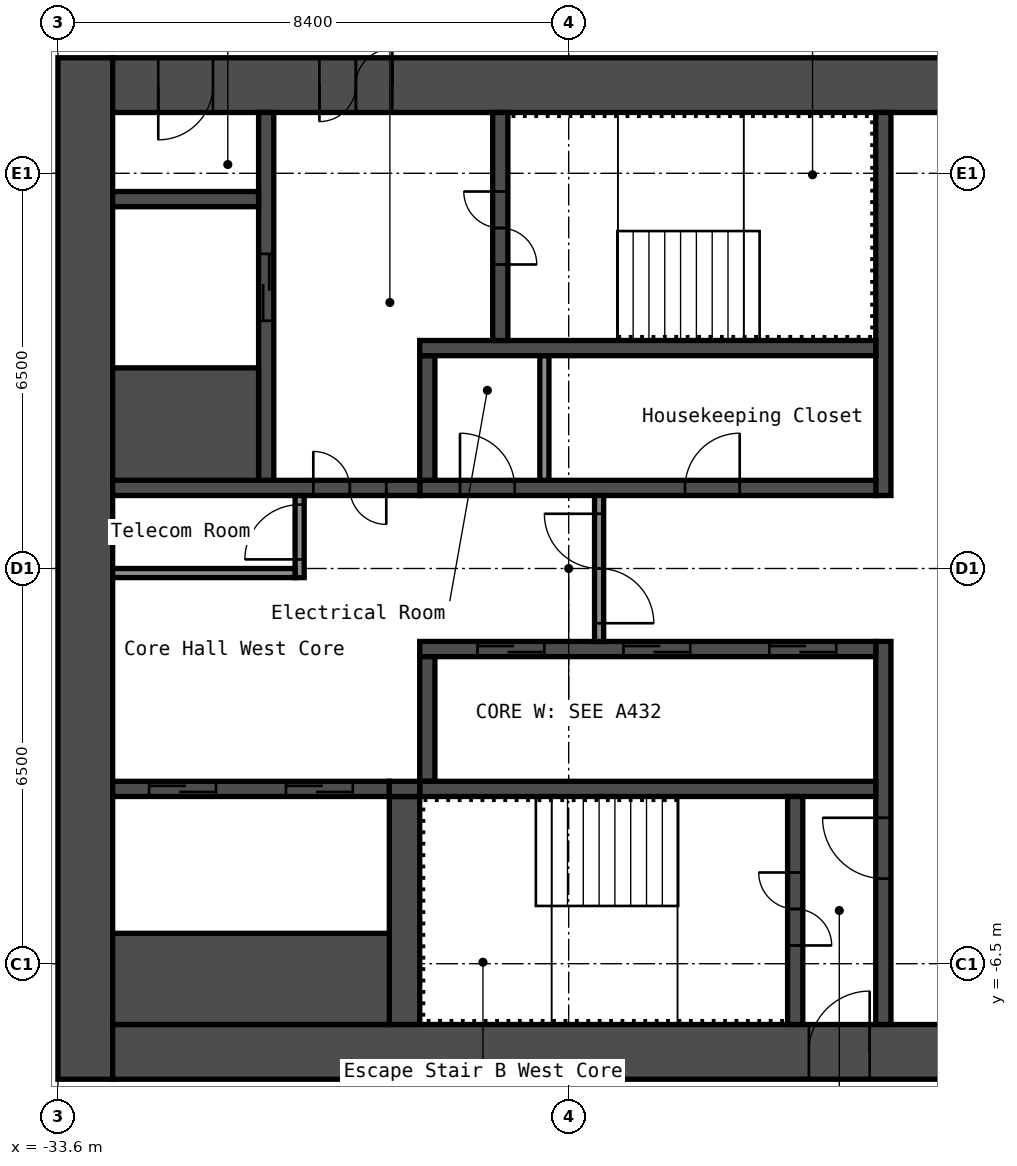
"""IFC4 building model, lengths in metres.
Left out: names, types, materials, properties, quantities, classifications, styles, units other than length and angle.
Written with IfcOpenShell. Run it as: python <this file> out.ifc"""

import sys

from ifc_helpers import new_model, si_unit, direction, frame, frame_2d, origin, place, context, subcontext, project, spatial, rectangle, extrude, element, fill, save


model = new_model("IFC4")
c1 = context("Model", 3, precision=1e-05, world=origin(), true_north=direction((0.0, 1.0)))
c2 = subcontext(c1, "Body", "Model", "MODEL_VIEW")
j1 = project(units=[si_unit("LENGTHUNIT", "METRE"), si_unit("PLANEANGLEUNIT", "RADIAN")], contexts=[c1])
p1 = place(None, origin())
s1 = spatial("IfcSite", under=j1, at=p1, CompositionType="ELEMENT")
p2 = place(p1, origin())
s2 = spatial("IfcBuilding", under=s1, at=p2, CompositionType="ELEMENT")
p3 = place(p2, frame((0.0, 0.0, 225.0)))
s3 = spatial("IfcBuildingStorey", under=s2, at=p3, CompositionType="ELEMENT", Elevation=225.0)
p4 = place(p3, frame((-33.15, -8.4, 0.0), z_axis=(0.0, 0.0, 1.0), x_axis=(0.0, 1.0, 0.0)))
e1 = element("IfcWall", 1, at=p4, inside=s3, PredefinedType="SHEAR", context=c2, shape_type="SweptSolid", body=[
    extrude(rectangle(XDim=16.8, YDim=0.9, at=frame_2d((8.4, 0.0))), origin(), (0.0, 0.0, 1.0), 2.9),
])
p5 = place(p3, frame((-32.7, 7.95, 0.0), z_axis=(0.0, 0.0, 1.0), x_axis=(1.0, 0.0, 0.0)))
e2 = element("IfcWall", 2, at=p5, inside=s3, PredefinedType="SHEAR", context=c2, shape_type="SweptSolid", body=[
    extrude(rectangle(XDim=15.0, YDim=0.9, at=frame_2d((7.5, 0.0))), origin(), (0.0, 0.0, 1.0), 2.9),
])
p6 = place(p5, frame((3.4, 0.0, 0.0)))
e3 = element("IfcOpeningElement", 3, at=p6, cuts=e2, PredefinedType="OPENING", context=c2, shape_type="SweptSolid", body=[
    extrude(rectangle(XDim=1.2, YDim=2.1, at=frame_2d((0.6, 1.05))), frame((0.0, 0.46, 0.0), z_axis=(0.0, -1.0, 0.0), x_axis=(1.0, 0.0, 0.0)), (0.0, 0.0, 1.0), 0.92),
])
p7 = place(p5, frame((0.75, 0.0, 0.0)))
e4 = element("IfcOpeningElement", 4, at=p7, cuts=e2, PredefinedType="OPENING", context=c2, shape_type="SweptSolid", body=[
    extrude(rectangle(XDim=0.9, YDim=2.1, at=frame_2d((0.45, 1.05))), frame((0.0, 0.46, 0.0), z_axis=(0.0, -1.0, 0.0), x_axis=(1.0, 0.0, 0.0)), (0.0, 0.0, 1.0), 0.92),
])
p8 = place(p3, frame((-32.7, -7.95, 0.0), z_axis=(0.0, 0.0, 1.0), x_axis=(1.0, 0.0, 0.0)))
e5 = element("IfcWall", 5, at=p8, inside=s3, PredefinedType="SHEAR", context=c2, shape_type="SweptSolid", body=[
    extrude(rectangle(XDim=15.0, YDim=0.9, at=frame_2d((7.5, 0.0))), origin(), (0.0, 0.0, 1.0), 2.9),
])
p9 = place(p8, frame((11.45, 0.0, 0.0)))
e6 = element("IfcOpeningElement", 6, at=p9, cuts=e5, PredefinedType="OPENING", context=c2, shape_type="SweptSolid", body=[
    extrude(rectangle(XDim=1.0, YDim=2.1, at=frame_2d((0.5, 1.05))), frame((0.0, 0.46, 0.0), z_axis=(0.0, -1.0, 0.0), x_axis=(1.0, 0.0, 0.0)), (0.0, 0.0, 1.0), 0.92),
])
p10 = place(p3, frame((-20.025, 1.2, 0.0), z_axis=(0.0, 0.0, 1.0), x_axis=(0.0, 1.0, 0.0)))
e7 = element("IfcWall", 7, at=p10, inside=s3, PredefinedType="SHEAR", context=c2, shape_type="SweptSolid", body=[
    extrude(rectangle(XDim=6.3, YDim=0.25, at=frame_2d((3.15, 0.0))), origin(), (0.0, 0.0, 1.0), 2.9),
])
p11 = place(p3, frame((-20.025, -7.5, 0.0), z_axis=(0.0, 0.0, 1.0), x_axis=(0.0, 1.0, 0.0)))
e8 = element("IfcWall", 8, at=p11, inside=s3, PredefinedType="SHEAR", context=c2, shape_type="SweptSolid", body=[
    extrude(rectangle(XDim=6.3, YDim=0.25, at=frame_2d((3.15, 0.0))), origin(), (0.0, 0.0, 1.0), 2.9),
])
p12 = place(p11, frame((2.4, 0.0, 0.0)))
e9 = element("IfcOpeningElement", 9, at=p12, cuts=e8, PredefinedType="OPENING", context=c2, shape_type="SweptSolid", body=[
    extrude(rectangle(XDim=1.0, YDim=2.1, at=frame_2d((0.5, 1.05))), frame((0.0, 0.135, 0.0), z_axis=(0.0, -1.0, 0.0), x_axis=(1.0, 0.0, 0.0)), (0.0, 0.0, 1.0), 0.27),
])
p13 = place(p3, frame((-27.65, 1.325, 0.0), z_axis=(0.0, 0.0, 1.0), x_axis=(1.0, 0.0, 0.0)))
e10 = element("IfcWall", 10, at=p13, inside=s3, PredefinedType="SHEAR", context=c2, shape_type="SweptSolid", body=[
    extrude(rectangle(XDim=7.5, YDim=0.25, at=frame_2d((3.75, 0.0))), origin(), (0.0, 0.0, 1.0), 2.9),
])
p14 = place(p13, frame((4.363, 0.0, 0.0)))
e11 = element("IfcOpeningElement", 11, at=p14, cuts=e10, PredefinedType="OPENING", context=c2, shape_type="SweptSolid", body=[
    extrude(rectangle(XDim=0.9, YDim=2.1, at=frame_2d((0.45, 1.05))), frame((0.0, 0.135, 0.0), z_axis=(0.0, -1.0, 0.0), x_axis=(1.0, 0.0, 0.0)), (0.0, 0.0, 1.0), 0.27),
])
p15 = place(p13, frame((0.663, 0.0, 0.0)))
e12 = element("IfcOpeningElement", 12, at=p15, cuts=e10, PredefinedType="OPENING", context=c2, shape_type="SweptSolid", body=[
    extrude(rectangle(XDim=0.9, YDim=2.1, at=frame_2d((0.45, 1.05))), frame((0.0, 0.135, 0.0), z_axis=(0.0, -1.0, 0.0), x_axis=(1.0, 0.0, 0.0)), (0.0, 0.0, 1.0), 0.27),
])
p16 = place(p3, frame((-27.525, 1.45, 0.0), z_axis=(0.0, 0.0, 1.0), x_axis=(0.0, 1.0, 0.0)))
e13 = element("IfcWall", 13, at=p16, inside=s3, PredefinedType="SHEAR", context=c2, shape_type="SweptSolid", body=[
    extrude(rectangle(XDim=2.05, YDim=0.25, at=frame_2d((1.025, 0.0))), origin(), (0.0, 0.0, 1.0), 2.9),
])
p17 = place(p3, frame((-27.65, 3.625, 0.0), z_axis=(0.0, 0.0, 1.0), x_axis=(1.0, 0.0, 0.0)))
e14 = element("IfcWall", 14, at=p17, inside=s3, PredefinedType="SHEAR", context=c2, shape_type="SweptSolid", body=[
    extrude(rectangle(XDim=7.5, YDim=0.25, at=frame_2d((3.75, 0.0))), origin(), (0.0, 0.0, 1.0), 2.9),
])
p18 = place(p3, frame((-26.325, 3.75, 0.0), z_axis=(0.0, 0.0, 1.0), x_axis=(0.0, 1.0, 0.0)))
e15 = element("IfcWall", 15, at=p18, inside=s3, PredefinedType="SHEAR", context=c2, shape_type="SweptSolid", body=[
    extrude(rectangle(XDim=3.75, YDim=0.25, at=frame_2d((1.875, 0.0))), origin(), (0.0, 0.0, 1.0), 2.9),
])
p19 = place(p18, frame((1.25, 0.0, 0.0)))
e16 = element("IfcOpeningElement", 16, at=p19, cuts=e15, PredefinedType="OPENING", context=c2, shape_type="SweptSolid", body=[
    extrude(rectangle(XDim=1.2, YDim=2.1, at=frame_2d((0.6, 1.05))), frame((0.0, 0.135, 0.0), z_axis=(0.0, -1.0, 0.0), x_axis=(1.0, 0.0, 0.0)), (0.0, 0.0, 1.0), 0.27),
])
p20 = place(p3, frame((-32.7, 1.325, 0.0), z_axis=(0.0, 0.0, 1.0), x_axis=(1.0, 0.0, 0.0)))
e17 = element("IfcWall", 17, at=p20, inside=s3, PredefinedType="SHEAR", context=c2, shape_type="SweptSolid", body=[
    extrude(rectangle(XDim=5.05, YDim=0.25, at=frame_2d((2.525, 0.0))), origin(), (0.0, 0.0, 1.0), 2.9),
])
p21 = place(p20, frame((3.3, 0.0, 0.0)))
e18 = element("IfcOpeningElement", 18, at=p21, cuts=e17, PredefinedType="OPENING", context=c2, shape_type="SweptSolid", body=[
    extrude(rectangle(XDim=1.2, YDim=2.1, at=frame_2d((0.6, 1.05))), frame((0.0, 0.135, 0.0), z_axis=(0.0, -1.0, 0.0), x_axis=(1.0, 0.0, 0.0)), (0.0, 0.0, 1.0), 0.27),
])
p22 = place(p3, frame((-30.175, 1.45, 0.0), z_axis=(0.0, 0.0, 1.0), x_axis=(0.0, 1.0, 0.0)))
e19 = element("IfcWall", 19, at=p22, inside=s3, PredefinedType="SHEAR", context=c2, shape_type="SweptSolid", body=[
    extrude(rectangle(XDim=6.05, YDim=0.25, at=frame_2d((3.025, 0.0))), origin(), (0.0, 0.0, 1.0), 2.9),
])
p23 = place(p22, frame((2.625, 0.0, 0.0)))
e20 = element("IfcOpeningElement", 20, at=p23, cuts=e19, PredefinedType="OPENING", context=c2, shape_type="SweptSolid", body=[
    extrude(rectangle(XDim=1.1, YDim=2.1, at=frame_2d((0.55, 1.05))), frame((0.0, 0.135, 0.0), z_axis=(0.0, -1.0, 0.0), x_axis=(1.0, 0.0, 0.0)), (0.0, 0.0, 1.0), 0.27),
])
p24 = place(p3, frame((-32.7, 2.375, 0.0), z_axis=(0.0, 0.0, 1.0), x_axis=(1.0, 0.0, 0.0)))
e21 = element("IfcWall", 21, at=p24, inside=s3, PredefinedType="SHEAR", context=c2, shape_type="SweptSolid", body=[
    extrude(rectangle(XDim=2.4, YDim=1.85, at=frame_2d((1.2, 0.0))), origin(), (0.0, 0.0, 1.0), 2.9),
])
p25 = place(p3, frame((-32.7, 6.075, 0.0), z_axis=(0.0, 0.0, 1.0), x_axis=(1.0, 0.0, 0.0)))
e22 = element("IfcWall", 22, at=p25, inside=s3, PredefinedType="SHEAR", context=c2, shape_type="SweptSolid", body=[
    extrude(rectangle(XDim=2.4, YDim=0.25, at=frame_2d((1.2, 0.0))), origin(), (0.0, 0.0, 1.0), 2.9),
])
p26 = place(p3, frame((-27.65, -1.325, 0.0), z_axis=(0.0, 0.0, 1.0), x_axis=(1.0, 0.0, 0.0)))
e23 = element("IfcWall", 23, at=p26, inside=s3, PredefinedType="SHEAR", context=c2, shape_type="SweptSolid", body=[
    extrude(rectangle(XDim=7.5, YDim=0.25, at=frame_2d((3.75, 0.0))), origin(), (0.0, 0.0, 1.0), 2.9),
])
p27 = place(p26, frame((5.75, 0.0, 0.0)))
e24 = element("IfcOpeningElement", 24, at=p27, cuts=e23, PredefinedType="OPENING", context=c2, shape_type="SweptSolid", body=[
    extrude(rectangle(XDim=1.1, YDim=2.1, at=frame_2d((0.55, 1.05))), frame((0.0, 0.135, 0.0), z_axis=(0.0, -1.0, 0.0), x_axis=(1.0, 0.0, 0.0)), (0.0, 0.0, 1.0), 0.27),
])
p28 = place(p26, frame((3.35, 0.0, 0.0)))
e25 = element("IfcOpeningElement", 25, at=p28, cuts=e23, PredefinedType="OPENING", context=c2, shape_type="SweptSolid", body=[
    extrude(rectangle(XDim=1.1, YDim=2.1, at=frame_2d((0.55, 1.05))), frame((0.0, 0.135, 0.0), z_axis=(0.0, -1.0, 0.0), x_axis=(1.0, 0.0, 0.0)), (0.0, 0.0, 1.0), 0.27),
])
p29 = place(p26, frame((0.95, 0.0, 0.0)))
e26 = element("IfcOpeningElement", 26, at=p29, cuts=e23, PredefinedType="OPENING", context=c2, shape_type="SweptSolid", body=[
    extrude(rectangle(XDim=1.1, YDim=2.1, at=frame_2d((0.55, 1.05))), frame((0.0, 0.135, 0.0), z_axis=(0.0, -1.0, 0.0), x_axis=(1.0, 0.0, 0.0)), (0.0, 0.0, 1.0), 0.27),
])
p30 = place(p3, frame((-27.525, -3.5, 0.0), z_axis=(0.0, 0.0, 1.0), x_axis=(0.0, 1.0, 0.0)))
e27 = element("IfcWall", 27, at=p30, inside=s3, PredefinedType="SHEAR", context=c2, shape_type="SweptSolid", body=[
    extrude(rectangle(XDim=2.05, YDim=0.25, at=frame_2d((1.025, 0.0))), origin(), (0.0, 0.0, 1.0), 2.9),
])
p31 = place(p3, frame((-27.65, -3.625, 0.0), z_axis=(0.0, 0.0, 1.0), x_axis=(1.0, 0.0, 0.0)))
e28 = element("IfcWall", 28, at=p31, inside=s3, PredefinedType="SHEAR", context=c2, shape_type="SweptSolid", body=[
    extrude(rectangle(XDim=7.5, YDim=0.25, at=frame_2d((3.75, 0.0))), origin(), (0.0, 0.0, 1.0), 2.9),
])
p32 = place(p3, frame((-21.475, -7.5, 0.0), z_axis=(0.0, 0.0, 1.0), x_axis=(0.0, 1.0, 0.0)))
e29 = element("IfcWall", 29, at=p32, inside=s3, PredefinedType="SHEAR", context=c2, shape_type="SweptSolid", body=[
    extrude(rectangle(XDim=3.75, YDim=0.25, at=frame_2d((1.875, 0.0))), origin(), (0.0, 0.0, 1.0), 2.9),
])
p33 = place(p32, frame((1.3, 0.0, 0.0)))
e30 = element("IfcOpeningElement", 30, at=p33, cuts=e29, PredefinedType="OPENING", context=c2, shape_type="SweptSolid", body=[
    extrude(rectangle(XDim=1.2, YDim=2.1, at=frame_2d((0.6, 1.05))), frame((0.0, 0.135, 0.0), z_axis=(0.0, -1.0, 0.0), x_axis=(1.0, 0.0, 0.0)), (0.0, 0.0, 1.0), 0.27),
])
p34 = place(p3, frame((-27.9, -7.5, 0.0), z_axis=(0.0, 0.0, 1.0), x_axis=(0.0, 1.0, 0.0)))
e31 = element("IfcWall", 31, at=p34, inside=s3, PredefinedType="SHEAR", context=c2, shape_type="SweptSolid", body=[
    extrude(rectangle(XDim=3.75, YDim=0.5, at=frame_2d((1.875, 0.0))), origin(), (0.0, 0.0, 1.0), 2.9),
])
p35 = place(p3, frame((-32.7, -3.625, 0.0), z_axis=(0.0, 0.0, 1.0), x_axis=(1.0, 0.0, 0.0)))
e32 = element("IfcWall", 32, at=p35, inside=s3, PredefinedType="SHEAR", context=c2, shape_type="SweptSolid", body=[
    extrude(rectangle(XDim=4.55, YDim=0.25, at=frame_2d((2.275, 0.0))), origin(), (0.0, 0.0, 1.0), 2.9),
])
p36 = place(p35, frame((2.85, 0.0, 0.0)))
e33 = element("IfcOpeningElement", 33, at=p36, cuts=e32, PredefinedType="OPENING", context=c2, shape_type="SweptSolid", body=[
    extrude(rectangle(XDim=1.1, YDim=2.1, at=frame_2d((0.55, 1.05))), frame((0.0, 0.135, 0.0), z_axis=(0.0, -1.0, 0.0), x_axis=(1.0, 0.0, 0.0)), (0.0, 0.0, 1.0), 0.27),
])
p37 = place(p35, frame((0.6, 0.0, 0.0)))
e34 = element("IfcOpeningElement", 34, at=p37, cuts=e32, PredefinedType="OPENING", context=c2, shape_type="SweptSolid", body=[
    extrude(rectangle(XDim=1.1, YDim=2.1, at=frame_2d((0.55, 1.05))), frame((0.0, 0.135, 0.0), z_axis=(0.0, -1.0, 0.0), x_axis=(1.0, 0.0, 0.0)), (0.0, 0.0, 1.0), 0.27),
])
p38 = place(p3, frame((-32.7, -6.75, 0.0), z_axis=(0.0, 0.0, 1.0), x_axis=(1.0, 0.0, 0.0)))
e35 = element("IfcWall", 35, at=p38, inside=s3, PredefinedType="SHEAR", context=c2, shape_type="SweptSolid", body=[
    extrude(rectangle(XDim=4.55, YDim=1.5, at=frame_2d((2.275, 0.0))), origin(), (0.0, 0.0, 1.0), 2.9),
])
p39 = place(p3, frame((-28.15, -3.625, 0.0), z_axis=(0.0, 0.0, 1.0), x_axis=(1.0, 0.0, 0.0)))
e36 = element("IfcWall", 36, at=p39, inside=s3, PredefinedType="SHEAR", context=c2, shape_type="SweptSolid", body=[
    extrude(rectangle(XDim=0.5, YDim=0.25, at=frame_2d((0.25, 0.0))), origin(), (0.0, 0.0, 1.0), 2.9),
])
p40 = place(p3, frame((-24.7, -1.2, 0.0), z_axis=(0.0, 0.0, 1.0), x_axis=(0.0, 1.0, 0.0)))
e37 = element("IfcWall", 37, at=p40, inside=s3, PredefinedType="PARTITIONING", context=c2, shape_type="SweptSolid", body=[
    extrude(rectangle(XDim=2.4, YDim=0.15, at=frame_2d((1.2, 0.0))), origin(), (0.0, 0.0, 1.0), 2.9),
])
p41 = place(p40, frame((0.3, 0.0, 0.0)))
e38 = element("IfcOpeningElement", 38, at=p41, cuts=e37, PredefinedType="OPENING", context=c2, shape_type="SweptSolid", body=[
    extrude(rectangle(XDim=1.8, YDim=2.1, at=frame_2d((0.9, 1.05))), frame((0.0, 0.085, 0.0), z_axis=(0.0, -1.0, 0.0), x_axis=(1.0, 0.0, 0.0)), (0.0, 0.0, 1.0), 0.17),
])
p42 = place(p3, frame((-29.625, -0.15, 0.0), z_axis=(0.0, 0.0, 1.0), x_axis=(0.0, 1.0, 0.0)))
e39 = element("IfcWall", 39, at=p42, inside=s3, PredefinedType="PARTITIONING", context=c2, shape_type="SweptSolid", body=[
    extrude(rectangle(XDim=1.35, YDim=0.15, at=frame_2d((0.675, 0.0))), origin(), (0.0, 0.0, 1.0), 2.9),
])
p43 = place(p42, frame((0.3, 0.0, 0.0)))
e40 = element("IfcOpeningElement", 40, at=p43, cuts=e39, PredefinedType="OPENING", context=c2, shape_type="SweptSolid", body=[
    extrude(rectangle(XDim=0.9, YDim=2.1, at=frame_2d((0.45, 1.05))), frame((0.0, 0.085, 0.0), z_axis=(0.0, -1.0, 0.0), x_axis=(1.0, 0.0, 0.0)), (0.0, 0.0, 1.0), 0.17),
])
p44 = place(p3, frame((-32.7, -0.075, 0.0), z_axis=(0.0, 0.0, 1.0), x_axis=(1.0, 0.0, 0.0)))
e41 = element("IfcWall", 41, at=p44, inside=s3, PredefinedType="PARTITIONING", context=c2, shape_type="SweptSolid", body=[
    extrude(rectangle(XDim=3.0, YDim=0.15, at=frame_2d((1.5, 0.0))), origin(), (0.0, 0.0, 1.0), 2.9),
])
p45 = place(p3, frame((-25.6, 1.45, 0.0), z_axis=(0.0, 0.0, 1.0), x_axis=(0.0, 1.0, 0.0)))
e42 = element("IfcWall", 42, at=p45, inside=s3, PredefinedType="PARTITIONING", context=c2, shape_type="SweptSolid", body=[
    extrude(rectangle(XDim=2.05, YDim=0.15, at=frame_2d((1.025, 0.0))), origin(), (0.0, 0.0, 1.0), 2.9),
])
p46 = place(p6, origin())
e43 = element("IfcDoor", 43, at=p46, inside=s3, OperationType="DOUBLE_DOOR_SINGLE_SWING", PredefinedType="DOOR", context=c2, shape_type="SweptSolid", body=[
    extrude(rectangle(XDim=1.2, YDim=2.1, at=frame_2d((0.6, 1.05))), frame((0.0, 0.025, 0.0), z_axis=(0.0, -1.0, 0.0), x_axis=(1.0, 0.0, 0.0)), (0.0, 0.0, 1.0), 0.05),
])
fill(e3, e43)
p47 = place(p7, origin())
e44 = element("IfcDoor", 44, at=p47, inside=s3, OperationType="SINGLE_SWING_LEFT", PredefinedType="DOOR", context=c2, shape_type="SweptSolid", body=[
    extrude(rectangle(XDim=0.9, YDim=2.1, at=frame_2d((0.45, 1.05))), frame((0.0, 0.025, 0.0), z_axis=(0.0, -1.0, 0.0), x_axis=(1.0, 0.0, 0.0)), (0.0, 0.0, 1.0), 0.05),
])
fill(e4, e44)
p48 = place(p9, origin())
e45 = element("IfcDoor", 45, at=p48, inside=s3, OperationType="SINGLE_SWING_LEFT", PredefinedType="DOOR", context=c2, shape_type="SweptSolid", body=[
    extrude(rectangle(XDim=1.0, YDim=2.1, at=frame_2d((0.5, 1.05))), frame((0.0, 0.025, 0.0), z_axis=(0.0, -1.0, 0.0), x_axis=(1.0, 0.0, 0.0)), (0.0, 0.0, 1.0), 0.05),
])
fill(e6, e45)
p49 = place(p19, origin())
e46 = element("IfcDoor", 46, at=p49, inside=s3, OperationType="DOUBLE_DOOR_SINGLE_SWING", PredefinedType="DOOR", context=c2, shape_type="SweptSolid", body=[
    extrude(rectangle(XDim=1.2, YDim=2.1, at=frame_2d((0.6, 1.05))), frame((0.0, 0.025, 0.0), z_axis=(0.0, -1.0, 0.0), x_axis=(1.0, 0.0, 0.0)), (0.0, 0.0, 1.0), 0.05),
])
fill(e16, e46)
p50 = place(p33, origin())
e47 = element("IfcDoor", 47, at=p50, inside=s3, OperationType="DOUBLE_DOOR_SINGLE_SWING", PredefinedType="DOOR", context=c2, shape_type="SweptSolid", body=[
    extrude(rectangle(XDim=1.2, YDim=2.1, at=frame_2d((0.6, 1.05))), frame((0.0, 0.025, 0.0), z_axis=(0.0, -1.0, 0.0), x_axis=(1.0, 0.0, 0.0)), (0.0, 0.0, 1.0), 0.05),
])
fill(e30, e47)
p51 = place(p12, origin())
e48 = element("IfcDoor", 48, at=p51, inside=s3, OperationType="SINGLE_SWING_LEFT", PredefinedType="DOOR", context=c2, shape_type="SweptSolid", body=[
    extrude(rectangle(XDim=1.0, YDim=2.1, at=frame_2d((0.5, 1.05))), frame((0.0, 0.025, 0.0), z_axis=(0.0, -1.0, 0.0), x_axis=(1.0, 0.0, 0.0)), (0.0, 0.0, 1.0), 0.05),
])
fill(e9, e48)
p52 = place(p21, origin())
e49 = element("IfcDoor", 49, at=p52, inside=s3, OperationType="DOUBLE_DOOR_SINGLE_SWING", PredefinedType="DOOR", context=c2, shape_type="SweptSolid", body=[
    extrude(rectangle(XDim=1.2, YDim=2.1, at=frame_2d((0.6, 1.05))), frame((0.0, 0.025, 0.0), z_axis=(0.0, -1.0, 0.0), x_axis=(1.0, 0.0, 0.0)), (0.0, 0.0, 1.0), 0.05),
])
fill(e18, e49)
p53 = place(p41, origin())
e50 = element("IfcDoor", 50, at=p53, inside=s3, OperationType="DOUBLE_DOOR_SINGLE_SWING", PredefinedType="DOOR", context=c2, shape_type="SweptSolid", body=[
    extrude(rectangle(XDim=1.8, YDim=2.1, at=frame_2d((0.9, 1.05))), frame((0.0, 0.025, 0.0), z_axis=(0.0, -1.0, 0.0), x_axis=(1.0, 0.0, 0.0)), (0.0, 0.0, 1.0), 0.05),
])
fill(e38, e50)
p54 = place(p43, origin())
e51 = element("IfcDoor", 51, at=p54, inside=s3, OperationType="SINGLE_SWING_RIGHT", PredefinedType="DOOR", context=c2, shape_type="SweptSolid", body=[
    extrude(rectangle(XDim=0.9, YDim=2.1, at=frame_2d((0.45, 1.05))), frame((0.0, 0.025, 0.0), z_axis=(0.0, -1.0, 0.0), x_axis=(1.0, 0.0, 0.0)), (0.0, 0.0, 1.0), 0.05),
])
fill(e40, e51)
p55 = place(p14, origin())
e52 = element("IfcDoor", 52, at=p55, inside=s3, OperationType="SINGLE_SWING_LEFT", PredefinedType="DOOR", context=c2, shape_type="SweptSolid", body=[
    extrude(rectangle(XDim=0.9, YDim=2.1, at=frame_2d((0.45, 1.05))), frame((0.0, 0.025, 0.0), z_axis=(0.0, -1.0, 0.0), x_axis=(1.0, 0.0, 0.0)), (0.0, 0.0, 1.0), 0.05),
])
fill(e11, e52)
p56 = place(p15, origin())
e53 = element("IfcDoor", 53, at=p56, inside=s3, OperationType="SINGLE_SWING_RIGHT", PredefinedType="DOOR", context=c2, shape_type="SweptSolid", body=[
    extrude(rectangle(XDim=0.9, YDim=2.1, at=frame_2d((0.45, 1.05))), frame((0.0, 0.025, 0.0), z_axis=(0.0, -1.0, 0.0), x_axis=(1.0, 0.0, 0.0)), (0.0, 0.0, 1.0), 0.05),
])
fill(e12, e53)
p57 = place(p27, origin())
e54 = element("IfcDoor", 54, at=p57, inside=s3, OperationType="DOUBLE_DOOR_SLIDING", PredefinedType="DOOR", context=c2, shape_type="SweptSolid", body=[
    extrude(rectangle(XDim=1.1, YDim=2.1, at=frame_2d((0.55, 1.05))), frame((0.0, 0.025, 0.0), z_axis=(0.0, -1.0, 0.0), x_axis=(1.0, 0.0, 0.0)), (0.0, 0.0, 1.0), 0.05),
])
fill(e24, e54)
p58 = place(p28, origin())
e55 = element("IfcDoor", 55, at=p58, inside=s3, OperationType="DOUBLE_DOOR_SLIDING", PredefinedType="DOOR", context=c2, shape_type="SweptSolid", body=[
    extrude(rectangle(XDim=1.1, YDim=2.1, at=frame_2d((0.55, 1.05))), frame((0.0, 0.025, 0.0), z_axis=(0.0, -1.0, 0.0), x_axis=(1.0, 0.0, 0.0)), (0.0, 0.0, 1.0), 0.05),
])
fill(e25, e55)
p59 = place(p29, origin())
e56 = element("IfcDoor", 56, at=p59, inside=s3, OperationType="DOUBLE_DOOR_SLIDING", PredefinedType="DOOR", context=c2, shape_type="SweptSolid", body=[
    extrude(rectangle(XDim=1.1, YDim=2.1, at=frame_2d((0.55, 1.05))), frame((0.0, 0.025, 0.0), z_axis=(0.0, -1.0, 0.0), x_axis=(1.0, 0.0, 0.0)), (0.0, 0.0, 1.0), 0.05),
])
fill(e26, e56)
p60 = place(p23, origin())
e57 = element("IfcDoor", 57, at=p60, inside=s3, OperationType="DOUBLE_DOOR_SLIDING", PredefinedType="DOOR", context=c2, shape_type="SweptSolid", body=[
    extrude(rectangle(XDim=1.1, YDim=2.1, at=frame_2d((0.55, 1.05))), frame((0.0, 0.025, 0.0), z_axis=(0.0, -1.0, 0.0), x_axis=(1.0, 0.0, 0.0)), (0.0, 0.0, 1.0), 0.05),
])
fill(e20, e57)
p61 = place(p36, origin())
e58 = element("IfcDoor", 58, at=p61, inside=s3, OperationType="DOUBLE_DOOR_SLIDING", PredefinedType="DOOR", context=c2, shape_type="SweptSolid", body=[
    extrude(rectangle(XDim=1.1, YDim=2.1, at=frame_2d((0.55, 1.05))), frame((0.0, 0.025, 0.0), z_axis=(0.0, -1.0, 0.0), x_axis=(1.0, 0.0, 0.0)), (0.0, 0.0, 1.0), 0.05),
])
fill(e33, e58)
p62 = place(p37, origin())
e59 = element("IfcDoor", 59, at=p62, inside=s3, OperationType="DOUBLE_DOOR_SLIDING", PredefinedType="DOOR", context=c2, shape_type="SweptSolid", body=[
    extrude(rectangle(XDim=1.1, YDim=2.1, at=frame_2d((0.55, 1.05))), frame((0.0, 0.025, 0.0), z_axis=(0.0, -1.0, 0.0), x_axis=(1.0, 0.0, 0.0)), (0.0, 0.0, 1.0), 0.05),
])
fill(e34, e59)
save(model, sys.argv[1])
